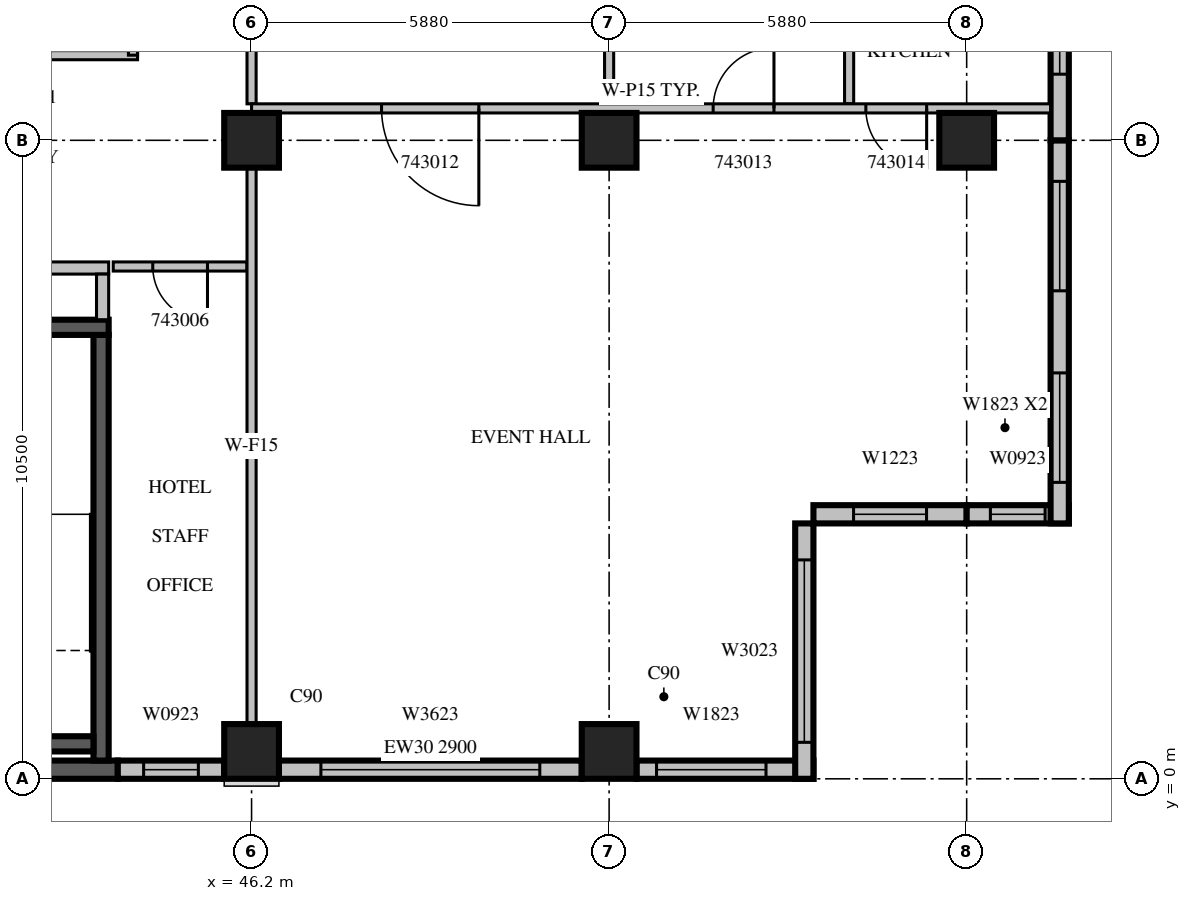
"""IFC4 building model, lengths in metres.
Left out: names, types, materials, properties, quantities, classifications, styles, units other than length and angle.
Written with IfcOpenShell. Run it as: python <this file> out.ifc"""

import sys

from ifc_helpers import new_model, si_unit, direction, frame, frame_2d, origin, origin_2d, place, context, subcontext, project, spatial, rectangle, extrude, source, transform, mapped, element, fill, save


model = new_model("IFC4")
c1 = context("Model", 3, precision=1e-05, world=origin(), true_north=direction((0.0, 1.0)))
c2 = subcontext(c1, "Body", "Model", "MODEL_VIEW")
j1 = project(units=[si_unit("LENGTHUNIT", "METRE"), si_unit("PLANEANGLEUNIT", "RADIAN")], contexts=[c1])
p1 = place(None, origin())
s1 = spatial("IfcSite", under=j1, at=p1, CompositionType="ELEMENT")
p2 = place(p1, origin())
s2 = spatial("IfcBuilding", under=s1, at=p2, CompositionType="ELEMENT")
p3 = place(p2, frame((0.0, 0.0, 196.8)))
s3 = spatial("IfcBuildingStorey", under=s2, at=p3, CompositionType="ELEMENT", Elevation=196.8)
m1 = source(origin(), c2, "Body", "SweptSolid", [
    extrude(rectangle(XDim=0.9, YDim=0.9, at=origin_2d()), origin(), (0.0, 0.0, 1.0), 3.8),
])
for number, where, z_axis, x_axis in (
    (1, (46.2, 0.45, 0.0), (0.0, 0.0, 1.0), (1.0, 0.0, 0.0)),
    (2, (52.08, 0.45, 0.0), (0.0, 0.0, 1.0), (1.0, 0.0, 0.0)),
    (3, (46.2, 10.5, 0.0), (0.0, 0.0, 1.0), (1.0, 0.0, 0.0)),
    (4, (52.08, 10.5, 0.0), (0.0, 0.0, 1.0), (1.0, 0.0, 0.0)),
    (5, (57.96, 10.5, 0.0), (0.0, 0.0, 1.0), (1.0, 0.0, 0.0)),
):
    element("IfcColumn", number, at=place(p3, frame(where, z_axis=z_axis, x_axis=x_axis)), inside=s3, PredefinedType="COLUMN", context=c2, shape_type="MappedRepresentation", body=[
        mapped(m1, transform((0.0, 0.0, 0.0), scale=1.0)),
    ])
m2 = source(origin(), c2, "Body", "SweptSolid", [
    extrude(rectangle(XDim=3.8, YDim=0.3, at=frame_2d((1.9, 0.0))), origin(), (0.0, 0.0, 1.0), 3.4),
])
p4 = place(p3, frame((40.2, 0.15, 0.0), z_axis=(0.0, 0.0, 1.0), x_axis=(1.0, 0.0, 0.0)))
e6 = element("IfcWall", 6, at=p4, inside=s3, PredefinedType="SOLIDWALL", context=c2, shape_type="MappedRepresentation", body=[
    mapped(m2, transform((0.0, 0.0, 0.0), scale=1.0)),
])
m3 = source(origin(), c2, "Body", "SweptSolid", [
    extrude(rectangle(XDim=1.75, YDim=0.3, at=frame_2d((0.875, 0.0))), origin(), (0.0, 0.0, 1.0), 3.4),
])
p5 = place(p3, frame((44.0, 0.15, 0.0), z_axis=(0.0, 0.0, 1.0), x_axis=(1.0, 0.0, 0.0)))
e7 = element("IfcWall", 7, at=p5, inside=s3, PredefinedType="STANDARD", context=c2, shape_type="MappedRepresentation", body=[
    mapped(m3, transform((0.0, 0.0, 0.0), scale=1.0)),
])
m4 = source(origin(), c2, "Body", "SweptSolid", [
    extrude(rectangle(XDim=0.9, YDim=2.3, at=frame_2d((0.45, 1.15))), frame((0.0, 0.16, 0.0), z_axis=(0.0, -1.0, 0.0), x_axis=(1.0, 0.0, 0.0)), (0.0, 0.0, 1.0), 0.32),
])
p6 = place(p5, frame((0.425, 0.0, 0.6)))
e8 = element("IfcOpeningElement", 8, at=p6, cuts=e7, PredefinedType="OPENING", context=c2, shape_type="MappedRepresentation", body=[
    mapped(m4, transform((0.0, 0.0, 0.0), scale=1.0)),
])
m5 = source(origin(), c2, "Body", "SweptSolid", [
    extrude(rectangle(XDim=4.98, YDim=0.3, at=frame_2d((2.49, 0.0))), origin(), (0.0, 0.0, 1.0), 2.9),
])
p7 = place(p3, frame((46.65, 0.15, 0.0), z_axis=(0.0, 0.0, 1.0), x_axis=(1.0, 0.0, 0.0)))
e9 = element("IfcWall", 9, at=p7, inside=s3, PredefinedType="STANDARD", context=c2, shape_type="MappedRepresentation", body=[
    mapped(m5, transform((0.0, 0.0, 0.0), scale=1.0)),
])
m6 = source(origin(), c2, "Body", "SweptSolid", [
    extrude(rectangle(XDim=3.6, YDim=2.3, at=frame_2d((1.8, 1.15))), frame((0.0, 0.16, 0.0), z_axis=(0.0, -1.0, 0.0), x_axis=(1.0, 0.0, 0.0)), (0.0, 0.0, 1.0), 0.32),
])
p8 = place(p7, frame((0.69, 0.0, 0.6)))
e10 = element("IfcOpeningElement", 10, at=p8, cuts=e9, PredefinedType="OPENING", context=c2, shape_type="MappedRepresentation", body=[
    mapped(m6, transform((0.0, 0.0, 0.0), scale=1.0)),
])
m7 = source(origin(), c2, "Body", "SweptSolid", [
    extrude(rectangle(XDim=2.91, YDim=0.3, at=frame_2d((1.455, 0.0))), origin(), (0.0, 0.0, 1.0), 3.4),
])
p9 = place(p3, frame((52.53, 0.15, 0.0), z_axis=(0.0, 0.0, 1.0), x_axis=(1.0, 0.0, 0.0)))
e11 = element("IfcWall", 11, at=p9, inside=s3, PredefinedType="STANDARD", context=c2, shape_type="MappedRepresentation", body=[
    mapped(m7, transform((0.0, 0.0, 0.0), scale=1.0)),
])
m8 = source(origin(), c2, "Body", "SweptSolid", [
    extrude(rectangle(XDim=1.8, YDim=2.3, at=frame_2d((0.9, 1.15))), frame((0.0, 0.16, 0.0), z_axis=(0.0, -1.0, 0.0), x_axis=(1.0, 0.0, 0.0)), (0.0, 0.0, 1.0), 0.32),
])
p10 = place(p9, frame((0.33, 0.0, 0.6)))
e12 = element("IfcOpeningElement", 12, at=p10, cuts=e11, PredefinedType="OPENING", context=c2, shape_type="MappedRepresentation", body=[
    mapped(m8, transform((0.0, 0.0, 0.0), scale=1.0)),
])
m9 = source(origin(), c2, "Body", "SweptSolid", [
    extrude(rectangle(XDim=4.2, YDim=0.3, at=frame_2d((2.1, 0.0))), origin(), (0.0, 0.0, 1.0), 3.4),
])
p11 = place(p3, frame((55.29, 0.0, 0.0), z_axis=(0.0, 0.0, 1.0), x_axis=(0.0, 1.0, 0.0)))
e13 = element("IfcWall", 13, at=p11, inside=s3, PredefinedType="STANDARD", context=c2, shape_type="MappedRepresentation", body=[
    mapped(m9, transform((0.0, 0.0, 0.0), scale=1.0)),
])
m10 = source(origin(), c2, "Body", "SweptSolid", [
    extrude(rectangle(XDim=3.0, YDim=2.3, at=frame_2d((1.5, 1.15))), frame((0.0, 0.16, 0.0), z_axis=(0.0, -1.0, 0.0), x_axis=(1.0, 0.0, 0.0)), (0.0, 0.0, 1.0), 0.32),
])
p12 = place(p11, frame((0.6, 0.0, 0.6)))
e14 = element("IfcOpeningElement", 14, at=p12, cuts=e13, PredefinedType="OPENING", context=c2, shape_type="MappedRepresentation", body=[
    mapped(m10, transform((0.0, 0.0, 0.0), scale=1.0)),
])
m11 = source(origin(), c2, "Body", "SweptSolid", [
    extrude(rectangle(XDim=2.52, YDim=0.3, at=frame_2d((1.26, 0.0))), origin(), (0.0, 0.0, 1.0), 3.4),
])
p13 = place(p3, frame((55.44, 4.35, 0.0), z_axis=(0.0, 0.0, 1.0), x_axis=(1.0, 0.0, 0.0)))
e15 = element("IfcWall", 15, at=p13, inside=s3, PredefinedType="STANDARD", context=c2, shape_type="MappedRepresentation", body=[
    mapped(m11, transform((0.0, 0.0, 0.0), scale=1.0)),
])
m12 = source(origin(), c2, "Body", "SweptSolid", [
    extrude(rectangle(XDim=1.2, YDim=2.3, at=frame_2d((0.6, 1.15))), frame((0.0, 0.16, 0.0), z_axis=(0.0, -1.0, 0.0), x_axis=(1.0, 0.0, 0.0)), (0.0, 0.0, 1.0), 0.32),
])
p14 = place(p13, frame((0.66, 0.0, 0.6)))
e16 = element("IfcOpeningElement", 16, at=p14, cuts=e15, PredefinedType="OPENING", context=c2, shape_type="MappedRepresentation", body=[
    mapped(m12, transform((0.0, 0.0, 0.0), scale=1.0)),
])
m13 = source(origin(), c2, "Body", "SweptSolid", [
    extrude(rectangle(XDim=1.68, YDim=0.3, at=frame_2d((0.84, 0.0))), origin(), (0.0, 0.0, 1.0), 3.4),
])
p15 = place(p3, frame((57.96, 4.35, 0.0), z_axis=(0.0, 0.0, 1.0), x_axis=(1.0, 0.0, 0.0)))
e17 = element("IfcWall", 17, at=p15, inside=s3, PredefinedType="STANDARD", context=c2, shape_type="MappedRepresentation", body=[
    mapped(m13, transform((0.0, 0.0, 0.0), scale=1.0)),
])
p16 = place(p15, frame((0.39, 0.0, 0.6)))
e18 = element("IfcOpeningElement", 18, at=p16, cuts=e17, PredefinedType="OPENING", context=c2, shape_type="MappedRepresentation", body=[
    mapped(m4, transform((0.0, 0.0, 0.0), scale=1.0)),
])
m14 = source(origin(), c2, "Body", "SweptSolid", [
    extrude(rectangle(XDim=6.3, YDim=0.3, at=frame_2d((3.15, 0.0))), origin(), (0.0, 0.0, 1.0), 3.4),
])
p17 = place(p3, frame((59.49, 4.2, 0.0), z_axis=(0.0, 0.0, 1.0), x_axis=(0.0, 1.0, 0.0)))
e19 = element("IfcWall", 19, at=p17, inside=s3, PredefinedType="STANDARD", context=c2, shape_type="MappedRepresentation", body=[
    mapped(m14, transform((0.0, 0.0, 0.0), scale=1.0)),
])
p18 = place(p17, frame((0.675, 0.0, 0.6)))
e20 = element("IfcOpeningElement", 20, at=p18, cuts=e19, PredefinedType="OPENING", context=c2, shape_type="MappedRepresentation", body=[
    mapped(m8, transform((0.0, 0.0, 0.0), scale=1.0)),
])
p19 = place(p17, frame((3.825, 0.0, 0.6)))
e21 = element("IfcOpeningElement", 21, at=p19, cuts=e19, PredefinedType="OPENING", context=c2, shape_type="MappedRepresentation", body=[
    mapped(m8, transform((0.0, 0.0, 0.0), scale=1.0)),
])
m15 = source(origin(), c2, "Body", "SweptSolid", [
    extrude(rectangle(XDim=3.375, YDim=0.3, at=frame_2d((1.688, 0.0))), origin(), (0.0, 0.0, 1.0), 3.4),
])
p20 = place(p3, frame((59.49, 10.5, 0.0), z_axis=(0.0, 0.0, 1.0), x_axis=(0.0, 1.0, 0.0)))
e22 = element("IfcWall", 22, at=p20, inside=s3, PredefinedType="STANDARD", context=c2, shape_type="MappedRepresentation", body=[
    mapped(m15, transform((0.0, 0.0, 0.0), scale=1.0)),
])
p21 = place(p20, frame((1.087, 0.0, 0.6)))
e23 = element("IfcOpeningElement", 23, at=p21, cuts=e22, PredefinedType="OPENING", context=c2, shape_type="MappedRepresentation", body=[
    mapped(m12, transform((0.0, 0.0, 0.0), scale=1.0)),
])
m16 = source(origin(), c2, "Body", "SweptSolid", [
    extrude(rectangle(XDim=7.0, YDim=0.25, at=frame_2d((3.5, 0.0))), origin(), (0.0, 0.0, 1.0), 3.4),
])
p22 = place(p3, frame((43.725, 0.3, 0.0), z_axis=(0.0, 0.0, 1.0), x_axis=(0.0, 1.0, 0.0)))
e24 = element("IfcWall", 24, at=p22, inside=s3, PredefinedType="SOLIDWALL", context=c2, shape_type="MappedRepresentation", body=[
    mapped(m16, transform((0.0, 0.0, 0.0), scale=1.0)),
])
m17 = source(origin(), c2, "Body", "SweptSolid", [
    extrude(rectangle(XDim=3.45, YDim=0.25, at=frame_2d((1.725, 0.0))), origin(), (0.0, 0.0, 1.0), 3.4),
])
p23 = place(p3, frame((40.4, 7.425, 0.0), z_axis=(0.0, 0.0, 1.0), x_axis=(1.0, 0.0, 0.0)))
e25 = element("IfcWall", 25, at=p23, inside=s3, PredefinedType="SOLIDWALL", context=c2, shape_type="MappedRepresentation", body=[
    mapped(m17, transform((0.0, 0.0, 0.0), scale=1.0)),
])
m18 = source(origin(), c2, "Body", "SweptSolid", [
    extrude(rectangle(XDim=2.95, YDim=0.25, at=frame_2d((1.475, 0.0))), origin(), (0.0, 0.0, 1.0), 3.4),
])
p24 = place(p3, frame((40.65, 0.575, 0.0), z_axis=(0.0, 0.0, 1.0), x_axis=(1.0, 0.0, 0.0)))
e26 = element("IfcWall", 26, at=p24, inside=s3, PredefinedType="SOLIDWALL", context=c2, shape_type="MappedRepresentation", body=[
    mapped(m18, transform((0.0, 0.0, 0.0), scale=1.0)),
])
m19 = source(origin(), c2, "Body", "SweptSolid", [
    extrude(rectangle(XDim=5.45, YDim=0.2, at=frame_2d((2.725, 0.0))), origin(), (0.0, 0.0, 1.0), 3.4),
])
p25 = place(p3, frame((38.4, 8.4, 0.0), z_axis=(0.0, 0.0, 1.0), x_axis=(1.0, 0.0, 0.0)))
e27 = element("IfcWall", 27, at=p25, inside=s3, PredefinedType="PARTITIONING", context=c2, shape_type="MappedRepresentation", body=[
    mapped(m19, transform((0.0, 0.0, 0.0), scale=1.0)),
])
m20 = source(origin(), c2, "Body", "SweptSolid", [
    extrude(rectangle(XDim=1.2, YDim=2.1, at=frame_2d((0.6, 1.05))), frame((0.0, 0.11, 0.0), z_axis=(0.0, -1.0, 0.0), x_axis=(1.0, 0.0, 0.0)), (0.0, 0.0, 1.0), 0.22),
])
p26 = place(p25, frame((0.4, 0.0, 0.0)))
e28 = element("IfcOpeningElement", 28, at=p26, cuts=e27, PredefinedType="OPENING", context=c2, shape_type="MappedRepresentation", body=[
    mapped(m20, transform((0.0, 0.0, 0.0), scale=1.0)),
])
m21 = source(origin(), c2, "Body", "SweptSolid", [
    extrude(rectangle(XDim=0.9, YDim=2.1, at=frame_2d((0.45, 1.05))), frame((0.0, 0.11, 0.0), z_axis=(0.0, -1.0, 0.0), x_axis=(1.0, 0.0, 0.0)), (0.0, 0.0, 1.0), 0.22),
])
p27 = place(p25, frame((3.25, 0.0, 0.0)))
e29 = element("IfcOpeningElement", 29, at=p27, cuts=e27, PredefinedType="OPENING", context=c2, shape_type="MappedRepresentation", body=[
    mapped(m21, transform((0.0, 0.0, 0.0), scale=1.0)),
])
m22 = source(origin(), c2, "Body", "SweptSolid", [
    extrude(rectangle(XDim=0.75, YDim=0.2, at=frame_2d((0.375, 0.0))), origin(), (0.0, 0.0, 1.0), 3.4),
])
p28 = place(p3, frame((43.75, 7.55, 0.0), z_axis=(0.0, 0.0, 1.0), x_axis=(0.0, 1.0, 0.0)))
e30 = element("IfcWall", 30, at=p28, inside=s3, PredefinedType="PARTITIONING", context=c2, shape_type="MappedRepresentation", body=[
    mapped(m22, transform((0.0, 0.0, 0.0), scale=1.0)),
])
m23 = source(origin(), c2, "Body", "SweptSolid", [
    extrude(rectangle(XDim=6.45, YDim=0.15, at=frame_2d((3.225, 0.0))), origin(), (0.0, 0.0, 1.0), 3.4),
])
p29 = place(p3, frame((37.875, 11.9, 0.0), z_axis=(0.0, 0.0, 1.0), x_axis=(1.0, 0.0, 0.0)))
e31 = element("IfcWall", 31, at=p29, inside=s3, PredefinedType="PARTITIONING", context=c2, shape_type="MappedRepresentation", body=[
    mapped(m23, transform((0.0, 0.0, 0.0), scale=1.0)),
])
m24 = source(origin(), c2, "Body", "SweptSolid", [
    extrude(rectangle(XDim=2.875, YDim=0.15, at=frame_2d((1.438, 0.0))), origin(), (0.0, 0.0, 1.0), 3.4),
])
p30 = place(p3, frame((44.25, 11.9, 0.0), z_axis=(0.0, 0.0, 1.0), x_axis=(0.0, 1.0, 0.0)))
e32 = element("IfcWall", 32, at=p30, inside=s3, PredefinedType="PARTITIONING", context=c2, shape_type="MappedRepresentation", body=[
    mapped(m24, transform((0.0, 0.0, 0.0), scale=1.0)),
])
m25 = source(origin(), c2, "Body", "SweptSolid", [
    extrude(rectangle(XDim=2.2, YDim=0.15, at=frame_2d((1.1, 0.0))), origin(), (0.0, 0.0, 1.0), 3.4),
])
p31 = place(p3, frame((46.125, 8.425, 0.0), z_axis=(0.0, 0.0, 1.0), x_axis=(-1.0, 0.0, 0.0)))
e33 = element("IfcWall", 33, at=p31, inside=s3, PredefinedType="PARTITIONING", context=c2, shape_type="MappedRepresentation", body=[
    mapped(m25, transform((0.0, 0.0, 0.0), scale=1.0)),
])
m26 = source(origin(), c2, "Body", "SweptSolid", [
    extrude(rectangle(XDim=0.9, YDim=2.1, at=frame_2d((0.45, 1.05))), frame((0.0, 0.085, 0.0), z_axis=(0.0, -1.0, 0.0), x_axis=(1.0, 0.0, 0.0)), (0.0, 0.0, 1.0), 0.17),
])
p32 = place(p31, frame((0.65, 0.0, 0.0)))
e34 = element("IfcOpeningElement", 34, at=p32, cuts=e33, PredefinedType="OPENING", context=c2, shape_type="MappedRepresentation", body=[
    mapped(m26, transform((0.0, 0.0, 0.0), scale=1.0)),
])
m27 = source(origin(), c2, "Body", "SweptSolid", [
    extrude(rectangle(XDim=3.6, YDim=0.15, at=frame_2d((1.8, 0.0))), origin(), (0.0, 0.0, 1.0), 3.4),
])
for number, where, z_axis, x_axis in (
    (35, (52.08, 11.1, 0.0), (0.0, 0.0, 1.0), (0.0, 1.0, 0.0)),
    (36, (56.027, 11.1, 0.0), (0.0, 0.0, 1.0), (0.0, 1.0, 0.0)),
):
    element("IfcWall", number, at=place(p3, frame(where, z_axis=z_axis, x_axis=x_axis)), inside=s3, PredefinedType="PARTITIONING", context=c2, shape_type="MappedRepresentation", body=[
        mapped(m27, transform((0.0, 0.0, 0.0), scale=1.0)),
    ])
m28 = source(origin(), c2, "Body", "SweptSolid", [
    extrude(rectangle(XDim=9.152, YDim=0.15, at=frame_2d((4.576, 0.0))), origin(), (0.0, 0.0, 1.0), 3.4),
])
p33 = place(p3, frame((46.2, 0.899, 0.0), z_axis=(0.0, 0.0, 1.0), x_axis=(0.0, 1.0, 0.0)))
e37 = element("IfcWall", 37, at=p33, inside=s3, PredefinedType="PARTITIONING", context=c2, shape_type="MappedRepresentation", body=[
    mapped(m28, transform((0.0, 0.0, 0.0), scale=1.0)),
])
p34 = place(p3, frame((46.2, 11.1, 0.0), z_axis=(0.0, 0.0, 1.0), x_axis=(0.0, 1.0, 0.0)))
e38 = element("IfcWall", 38, at=p34, inside=s3, PredefinedType="PARTITIONING", context=c2, shape_type="MappedRepresentation", body=[
    mapped(m27, transform((0.0, 0.0, 0.0), scale=1.0)),
])
m29 = source(origin(), c2, "Body", "SweptSolid", [
    extrude(rectangle(XDim=13.14, YDim=0.15, at=frame_2d((6.57, 0.0))), origin(), (0.0, 0.0, 1.0), 3.4),
])
p35 = place(p3, frame((59.34, 11.025, 0.0), z_axis=(0.0, 0.0, 1.0), x_axis=(-1.0, 0.0, 0.0)))
e39 = element("IfcWall", 39, at=p35, inside=s3, PredefinedType="PARTITIONING", context=c2, shape_type="MappedRepresentation", body=[
    mapped(m29, transform((0.0, 0.0, 0.0), scale=1.0)),
])
m30 = source(origin(), c2, "Body", "SweptSolid", [
    extrude(rectangle(XDim=1.6, YDim=2.1, at=frame_2d((0.8, 1.05))), frame((0.0, 0.085, 0.0), z_axis=(0.0, -1.0, 0.0), x_axis=(1.0, 0.0, 0.0)), (0.0, 0.0, 1.0), 0.17),
])
p36 = place(p35, frame((9.402, 0.0, 0.0)))
e40 = element("IfcOpeningElement", 40, at=p36, cuts=e39, PredefinedType="OPENING", context=c2, shape_type="MappedRepresentation", body=[
    mapped(m30, transform((0.0, 0.0, 0.0), scale=1.0)),
])
m31 = source(origin(), c2, "Body", "SweptSolid", [
    extrude(rectangle(XDim=1.0, YDim=2.1, at=frame_2d((0.5, 1.05))), frame((0.0, 0.085, 0.0), z_axis=(0.0, -1.0, 0.0), x_axis=(1.0, 0.0, 0.0)), (0.0, 0.0, 1.0), 0.17),
])
p37 = place(p35, frame((4.549, 0.0, 0.0)))
e41 = element("IfcOpeningElement", 41, at=p37, cuts=e39, PredefinedType="OPENING", context=c2, shape_type="MappedRepresentation", body=[
    mapped(m31, transform((0.0, 0.0, 0.0), scale=1.0)),
])
p38 = place(p35, frame((2.038, 0.0, 0.0)))
e42 = element("IfcOpeningElement", 42, at=p38, cuts=e39, PredefinedType="OPENING", context=c2, shape_type="MappedRepresentation", body=[
    mapped(m31, transform((0.0, 0.0, 0.0), scale=1.0)),
])
m32 = source(origin(), c2, "Body", "SweptSolid", [
    extrude(rectangle(XDim=0.9, YDim=2.3, at=frame_2d((0.45, 1.15))), frame((0.0, 0.03, 0.0), z_axis=(0.0, -1.0, 0.0), x_axis=(1.0, 0.0, 0.0)), (0.0, 0.0, 1.0), 0.06),
])
p39 = place(p6, origin())
e43 = element("IfcWindow", 43, at=p39, inside=s3, PartitioningType="SINGLE_PANEL", PredefinedType="WINDOW", context=c2, shape_type="MappedRepresentation", body=[
    mapped(m32, transform((0.0, 0.0, 0.0), scale=1.0)),
])
fill(e8, e43)
m33 = source(origin(), c2, "Body", "SweptSolid", [
    extrude(rectangle(XDim=3.6, YDim=2.3, at=frame_2d((1.8, 1.15))), frame((0.0, 0.03, 0.0), z_axis=(0.0, -1.0, 0.0), x_axis=(1.0, 0.0, 0.0)), (0.0, 0.0, 1.0), 0.06),
])
p40 = place(p8, origin())
e44 = element("IfcWindow", 44, at=p40, inside=s3, PartitioningType="SINGLE_PANEL", PredefinedType="WINDOW", context=c2, shape_type="MappedRepresentation", body=[
    mapped(m33, transform((0.0, 0.0, 0.0), scale=1.0)),
])
fill(e10, e44)
m34 = source(origin(), c2, "Body", "SweptSolid", [
    extrude(rectangle(XDim=1.8, YDim=2.3, at=frame_2d((0.9, 1.15))), frame((0.0, 0.03, 0.0), z_axis=(0.0, -1.0, 0.0), x_axis=(1.0, 0.0, 0.0)), (0.0, 0.0, 1.0), 0.06),
])
p41 = place(p10, origin())
e45 = element("IfcWindow", 45, at=p41, inside=s3, PartitioningType="SINGLE_PANEL", PredefinedType="WINDOW", context=c2, shape_type="MappedRepresentation", body=[
    mapped(m34, transform((0.0, 0.0, 0.0), scale=1.0)),
])
fill(e12, e45)
m35 = source(origin(), c2, "Body", "SweptSolid", [
    extrude(rectangle(XDim=3.0, YDim=2.3, at=frame_2d((1.5, 1.15))), frame((0.0, 0.03, 0.0), z_axis=(0.0, -1.0, 0.0), x_axis=(1.0, 0.0, 0.0)), (0.0, 0.0, 1.0), 0.06),
])
p42 = place(p12, origin())
e46 = element("IfcWindow", 46, at=p42, inside=s3, PartitioningType="SINGLE_PANEL", PredefinedType="WINDOW", context=c2, shape_type="MappedRepresentation", body=[
    mapped(m35, transform((0.0, 0.0, 0.0), scale=1.0)),
])
fill(e14, e46)
m36 = source(origin(), c2, "Body", "SweptSolid", [
    extrude(rectangle(XDim=1.2, YDim=2.3, at=frame_2d((0.6, 1.15))), frame((0.0, 0.03, 0.0), z_axis=(0.0, -1.0, 0.0), x_axis=(1.0, 0.0, 0.0)), (0.0, 0.0, 1.0), 0.06),
])
p43 = place(p14, origin())
e47 = element("IfcWindow", 47, at=p43, inside=s3, PartitioningType="SINGLE_PANEL", PredefinedType="WINDOW", context=c2, shape_type="MappedRepresentation", body=[
    mapped(m36, transform((0.0, 0.0, 0.0), scale=1.0)),
])
fill(e16, e47)
p44 = place(p16, origin())
e48 = element("IfcWindow", 48, at=p44, inside=s3, PartitioningType="SINGLE_PANEL", PredefinedType="WINDOW", context=c2, shape_type="MappedRepresentation", body=[
    mapped(m32, transform((0.0, 0.0, 0.0), scale=1.0)),
])
fill(e18, e48)
p45 = place(p18, origin())
e49 = element("IfcWindow", 49, at=p45, inside=s3, PartitioningType="SINGLE_PANEL", PredefinedType="WINDOW", context=c2, shape_type="MappedRepresentation", body=[
    mapped(m34, transform((0.0, 0.0, 0.0), scale=1.0)),
])
fill(e20, e49)
p46 = place(p19, origin())
e50 = element("IfcWindow", 50, at=p46, inside=s3, PartitioningType="SINGLE_PANEL", PredefinedType="WINDOW", context=c2, shape_type="MappedRepresentation", body=[
    mapped(m34, transform((0.0, 0.0, 0.0), scale=1.0)),
])
fill(e21, e50)
p47 = place(p21, origin())
e51 = element("IfcWindow", 51, at=p47, inside=s3, PartitioningType="SINGLE_PANEL", PredefinedType="WINDOW", context=c2, shape_type="MappedRepresentation", body=[
    mapped(m36, transform((0.0, 0.0, 0.0), scale=1.0)),
])
fill(e23, e51)
m37 = source(origin(), c2, "Body", "SweptSolid", [
    extrude(rectangle(XDim=0.9, YDim=2.1, at=frame_2d((0.45, 1.05))), frame((0.0, 0.025, 0.0), z_axis=(0.0, -1.0, 0.0), x_axis=(1.0, 0.0, 0.0)), (0.0, 0.0, 1.0), 0.05),
])
p48 = place(p32, origin())
e52 = element("IfcDoor", 52, at=p48, inside=s3, OperationType="SINGLE_SWING_LEFT", PredefinedType="DOOR", context=c2, shape_type="MappedRepresentation", body=[
    mapped(m37, transform((0.0, 0.0, 0.0), scale=1.0)),
])
fill(e34, e52)
m38 = source(origin(), c2, "Body", "SweptSolid", [
    extrude(rectangle(XDim=1.6, YDim=2.1, at=frame_2d((0.8, 1.05))), frame((0.0, 0.025, 0.0), z_axis=(0.0, -1.0, 0.0), x_axis=(1.0, 0.0, 0.0)), (0.0, 0.0, 1.0), 0.05),
])
p49 = place(p36, origin())
e53 = element("IfcDoor", 53, at=p49, inside=s3, OperationType="SINGLE_SWING_LEFT", PredefinedType="DOOR", context=c2, shape_type="MappedRepresentation", body=[
    mapped(m38, transform((0.0, 0.0, 0.0), scale=1.0)),
])
fill(e40, e53)
m39 = source(origin(), c2, "Body", "SweptSolid", [
    extrude(rectangle(XDim=1.0, YDim=2.1, at=frame_2d((0.5, 1.05))), frame((0.0, 0.025, 0.0), z_axis=(0.0, -1.0, 0.0), x_axis=(1.0, 0.0, 0.0)), (0.0, 0.0, 1.0), 0.05),
])
p50 = place(p37, origin())
e54 = element("IfcDoor", 54, at=p50, inside=s3, OperationType="SINGLE_SWING_RIGHT", PredefinedType="DOOR", context=c2, shape_type="MappedRepresentation", body=[
    mapped(m39, transform((0.0, 0.0, 0.0), scale=1.0)),
])
fill(e41, e54)
p51 = place(p38, origin())
e55 = element("IfcDoor", 55, at=p51, inside=s3, OperationType="SINGLE_SWING_LEFT", PredefinedType="DOOR", context=c2, shape_type="MappedRepresentation", body=[
    mapped(m39, transform((0.0, 0.0, 0.0), scale=1.0)),
])
fill(e42, e55)
save(model, sys.argv[1])
